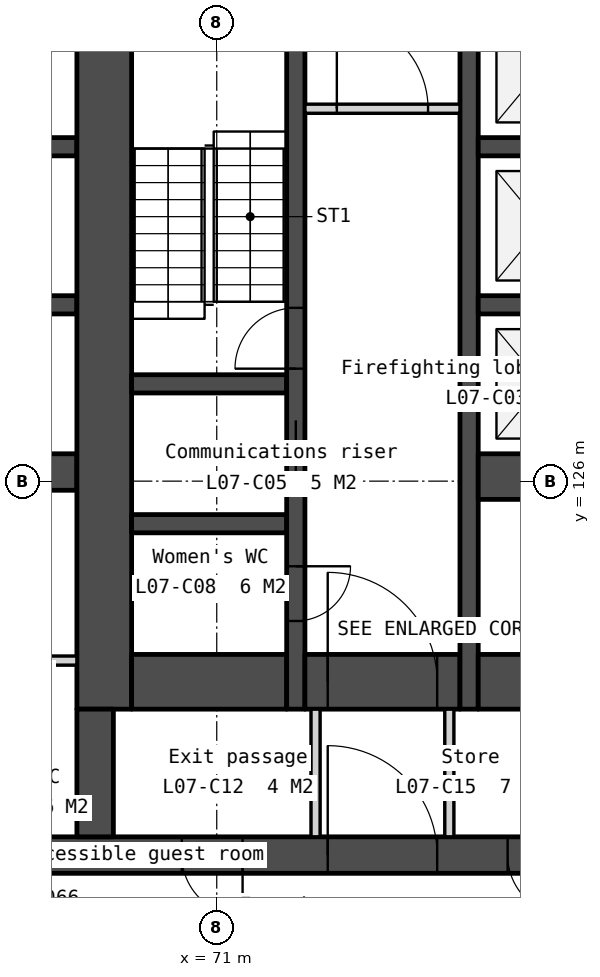
"""IFC4 building model, lengths in metres.
Left out: names, types, materials, properties, quantities, classifications, styles, units other than length and angle.
Written with IfcOpenShell. Run it as: python <this file> out.ifc"""

import sys

from ifc_helpers import new_model, si_unit, direction, frame, frame_2d, origin, place, context, subcontext, project, spatial, polyline, rectangle, outline, extrude, element, fill, save


model = new_model("IFC4")
c1 = context("Model", 3, precision=1e-05, world=origin(), true_north=direction((0.0, 1.0)))
c2 = subcontext(c1, "Body", "Model", "MODEL_VIEW")
j1 = project(units=[si_unit("LENGTHUNIT", "METRE"), si_unit("PLANEANGLEUNIT", "RADIAN")], contexts=[c1])
p1 = place(None, origin())
s1 = spatial("IfcSite", under=j1, at=p1, CompositionType="ELEMENT")
p2 = place(p1, origin())
s2 = spatial("IfcBuilding", under=s1, at=p2, CompositionType="ELEMENT")
p3 = place(p2, frame((0.0, 0.0, 38.5)))
s3 = spatial("IfcBuildingStorey", under=s2, at=p3, CompositionType="ELEMENT", Elevation=38.5)
p4 = place(p3, frame((66.0, 119.85, 0.0), z_axis=(0.0, 0.0, 1.0), x_axis=(1.0, 0.0, 0.0)))
e1 = element("IfcWall", 1, at=p4, inside=s3, PredefinedType="SOLIDWALL", context=c2, shape_type="SweptSolid", body=[
    extrude(rectangle(XDim=28.0, YDim=0.6, at=frame_2d((14.0, 0.0))), origin(), (0.0, 0.0, 1.0), 3.35),
])
p5 = place(p4, frame((6.825, 0.0, 0.0)))
e2 = element("IfcOpeningElement", 2, at=p5, cuts=e1, PredefinedType="OPENING", context=c2, shape_type="SweptSolid", body=[
    extrude(rectangle(XDim=1.8, YDim=2.1, at=frame_2d((0.9, 1.05))), frame((0.0, 0.31, 0.0), z_axis=(0.0, -1.0, 0.0), x_axis=(1.0, 0.0, 0.0)), (0.0, 0.0, 1.0), 0.62),
])
p6 = place(p4, frame((15.85, 0.0, 0.0)))
e3 = element("IfcOpeningElement", 3, at=p6, cuts=e1, PredefinedType="OPENING", context=c2, shape_type="SweptSolid", body=[
    extrude(rectangle(XDim=1.5, YDim=2.1, at=frame_2d((0.75, 1.05))), frame((0.0, 0.31, 0.0), z_axis=(0.0, -1.0, 0.0), x_axis=(1.0, 0.0, 0.0)), (0.0, 0.0, 1.0), 0.62),
])
p7 = place(p4, frame((19.375, 0.0, 0.0)))
e4 = element("IfcOpeningElement", 4, at=p7, cuts=e1, PredefinedType="OPENING", context=c2, shape_type="SweptSolid", body=[
    extrude(rectangle(XDim=1.8, YDim=2.1, at=frame_2d((0.9, 1.05))), frame((0.0, 0.31, 0.0), z_axis=(0.0, -1.0, 0.0), x_axis=(1.0, 0.0, 0.0)), (0.0, 0.0, 1.0), 0.62),
])
p8 = place(p4, frame((4.425, 0.0, 0.0)))
e5 = element("IfcOpeningElement", 5, at=p8, cuts=e1, PredefinedType="OPENING", context=c2, shape_type="SweptSolid", body=[
    extrude(rectangle(XDim=1.0, YDim=2.1, at=frame_2d((0.5, 1.05))), frame((0.0, 0.31, 0.0), z_axis=(0.0, -1.0, 0.0), x_axis=(1.0, 0.0, 0.0)), (0.0, 0.0, 1.0), 0.62),
])
p9 = place(p4, frame((9.783, 0.0, 0.0)))
e6 = element("IfcOpeningElement", 6, at=p9, cuts=e1, PredefinedType="OPENING", context=c2, shape_type="SweptSolid", body=[
    extrude(rectangle(XDim=1.0, YDim=2.1, at=frame_2d((0.5, 1.05))), frame((0.0, 0.31, 0.0), z_axis=(0.0, -1.0, 0.0), x_axis=(1.0, 0.0, 0.0)), (0.0, 0.0, 1.0), 0.62),
])
p10 = place(p4, frame((11.525, 0.0, 0.0)))
e7 = element("IfcOpeningElement", 7, at=p10, cuts=e1, PredefinedType="OPENING", context=c2, shape_type="SweptSolid", body=[
    extrude(rectangle(XDim=1.0, YDim=2.1, at=frame_2d((0.5, 1.05))), frame((0.0, 0.31, 0.0), z_axis=(0.0, -1.0, 0.0), x_axis=(1.0, 0.0, 0.0)), (0.0, 0.0, 1.0), 0.62),
])
p11 = place(p4, frame((13.658, 0.0, 0.0)))
e8 = element("IfcOpeningElement", 8, at=p11, cuts=e1, PredefinedType="OPENING", context=c2, shape_type="SweptSolid", body=[
    extrude(rectangle(XDim=1.0, YDim=2.1, at=frame_2d((0.5, 1.05))), frame((0.0, 0.31, 0.0), z_axis=(0.0, -1.0, 0.0), x_axis=(1.0, 0.0, 0.0)), (0.0, 0.0, 1.0), 0.62),
])
p12 = place(p4, frame((22.575, 0.0, 0.0)))
e9 = element("IfcOpeningElement", 9, at=p12, cuts=e1, PredefinedType="OPENING", context=c2, shape_type="SweptSolid", body=[
    extrude(rectangle(XDim=1.0, YDim=2.1, at=frame_2d((0.5, 1.05))), frame((0.0, 0.31, 0.0), z_axis=(0.0, -1.0, 0.0), x_axis=(1.0, 0.0, 0.0)), (0.0, 0.0, 1.0), 0.62),
])
for number, where, z_axis, x_axis in (
    (10, (66.6, 131.5, 0.0), (0.0, 0.0, 1.0), (1.0, 0.0, 0.0)),
    (11, (66.6, 128.9, 0.0), (0.0, 0.0, 1.0), (1.0, 0.0, 0.0)),
):
    element("IfcWall", number, at=place(p3, frame(where, z_axis=z_axis, x_axis=x_axis)), inside=s3, PredefinedType="SOLIDWALL", context=c2, shape_type="SweptSolid", body=[
        extrude(rectangle(XDim=2.1, YDim=0.3, at=frame_2d((1.05, 0.0))), origin(), (0.0, 0.0, 1.0), 3.35),
    ])
p13 = place(p3, frame((66.6, 126.15, 0.0), z_axis=(0.0, 0.0, 1.0), x_axis=(1.0, 0.0, 0.0)))
e12 = element("IfcWall", 12, at=p13, inside=s3, PredefinedType="SOLIDWALL", context=c2, shape_type="SweptSolid", body=[
    extrude(rectangle(XDim=2.1, YDim=0.6, at=frame_2d((1.05, 0.0))), origin(), (0.0, 0.0, 1.0), 3.35),
])
p14 = place(p3, frame((66.6, 123.049, 0.0), z_axis=(0.0, 0.0, 1.0), x_axis=(1.0, 0.0, 0.0)))
e13 = element("IfcWall", 13, at=p14, inside=s3, PredefinedType="PARTITIONING", context=c2, shape_type="SweptSolid", body=[
    extrude(rectangle(XDim=2.1, YDim=0.15, at=frame_2d((1.05, 0.0))), origin(), (0.0, 0.0, 1.0), 3.35),
])
p15 = place(p3, frame((69.15, 133.95, 0.0), z_axis=(0.0, 0.0, 1.0), x_axis=(0.0, -1.0, 0.0)))
e14 = element("IfcWall", 14, at=p15, inside=s3, PredefinedType="SOLIDWALL", context=c2, shape_type="SweptSolid", body=[
    extrude(rectangle(XDim=11.7, YDim=0.9, at=frame_2d((5.85, 0.0))), origin(), (0.0, 0.0, 1.0), 3.35),
])
p16 = place(p3, frame((69.0, 122.25, 0.0), z_axis=(0.0, 0.0, 1.0), x_axis=(0.0, -1.0, 0.0)))
e15 = element("IfcWall", 15, at=p16, inside=s3, PredefinedType="SOLIDWALL", context=c2, shape_type="SweptSolid", body=[
    extrude(rectangle(XDim=2.1, YDim=0.6, at=frame_2d((1.05, 0.0))), origin(), (0.0, 0.0, 1.0), 3.35),
])
for number, where, z_axis, x_axis in (
    (16, (69.6, 127.6, 0.0), (0.0, 0.0, 1.0), (1.0, 0.0, 0.0)),
    (17, (69.6, 125.3, 0.0), (0.0, 0.0, 1.0), (1.0, 0.0, 0.0)),
):
    element("IfcWall", number, at=place(p3, frame(where, z_axis=z_axis, x_axis=x_axis)), inside=s3, PredefinedType="SOLIDWALL", context=c2, shape_type="SweptSolid", body=[
        extrude(rectangle(XDim=2.55, YDim=0.3, at=frame_2d((1.275, 0.0))), origin(), (0.0, 0.0, 1.0), 3.35),
    ])
p17 = place(p3, frame((69.6, 122.7, 0.0), z_axis=(0.0, 0.0, 1.0), x_axis=(1.0, 0.0, 0.0)))
e18 = element("IfcWall", 18, at=p17, inside=s3, PredefinedType="SOLIDWALL", context=c2, shape_type="SweptSolid", body=[
    extrude(rectangle(XDim=2.55, YDim=0.9, at=frame_2d((1.275, 0.0))), origin(), (0.0, 0.0, 1.0), 3.35),
])
p18 = place(p3, frame((72.3, 133.95, 0.0), z_axis=(0.0, 0.0, 1.0), x_axis=(0.0, -1.0, 0.0)))
e19 = element("IfcWall", 19, at=p18, inside=s3, PredefinedType="SOLIDWALL", context=c2, shape_type="SweptSolid", body=[
    extrude(rectangle(XDim=11.7, YDim=0.3, at=frame_2d((5.85, 0.0))), origin(), (0.0, 0.0, 1.0), 3.35),
])
p19 = place(p18, frame((6.95, 0.0, 0.0)))
e20 = element("IfcOpeningElement", 20, at=p19, cuts=e19, PredefinedType="OPENING", context=c2, shape_type="SweptSolid", body=[
    extrude(rectangle(XDim=1.1, YDim=2.1, at=frame_2d((0.55, 1.05))), frame((0.0, 0.16, 0.0), z_axis=(0.0, -1.0, 0.0), x_axis=(1.0, 0.0, 0.0)), (0.0, 0.0, 1.0), 0.32),
])
p20 = place(p18, frame((9.35, 0.0, 0.0)))
e21 = element("IfcOpeningElement", 21, at=p20, cuts=e19, PredefinedType="OPENING", context=c2, shape_type="SweptSolid", body=[
    extrude(rectangle(XDim=0.9, YDim=2.1, at=frame_2d((0.45, 1.05))), frame((0.0, 0.16, 0.0), z_axis=(0.0, -1.0, 0.0), x_axis=(1.0, 0.0, 0.0)), (0.0, 0.0, 1.0), 0.32),
])
p21 = place(p18, frame((5.1, 0.0, 0.0)))
e22 = element("IfcOpeningElement", 22, at=p21, cuts=e19, PredefinedType="OPENING", context=c2, shape_type="SweptSolid", body=[
    extrude(rectangle(XDim=1.0, YDim=2.1, at=frame_2d((0.5, 1.05))), frame((0.0, 0.16, 0.0), z_axis=(0.0, -1.0, 0.0), x_axis=(1.0, 0.0, 0.0)), (0.0, 0.0, 1.0), 0.32),
])
p22 = place(p3, frame((72.45, 132.125, 0.0), z_axis=(0.0, 0.0, 1.0), x_axis=(1.0, 0.0, 0.0)))
e23 = element("IfcWall", 23, at=p22, inside=s3, PredefinedType="PARTITIONING", context=c2, shape_type="SweptSolid", body=[
    extrude(rectangle(XDim=2.55, YDim=0.15, at=frame_2d((1.275, 0.0))), origin(), (0.0, 0.0, 1.0), 3.35),
])
p23 = place(p22, frame((0.525, 0.0, 0.0)))
e24 = element("IfcOpeningElement", 24, at=p23, cuts=e23, PredefinedType="OPENING", context=c2, shape_type="SweptSolid", body=[
    extrude(rectangle(XDim=1.5, YDim=2.1, at=frame_2d((0.75, 1.05))), frame((0.0, 0.085, 0.0), z_axis=(0.0, -1.0, 0.0), x_axis=(1.0, 0.0, 0.0)), (0.0, 0.0, 1.0), 0.17),
])
p24 = place(p3, frame((72.45, 122.7, 0.0), z_axis=(0.0, 0.0, 1.0), x_axis=(1.0, 0.0, 0.0)))
e25 = element("IfcWall", 25, at=p24, inside=s3, PredefinedType="SOLIDWALL", context=c2, shape_type="SweptSolid", body=[
    extrude(rectangle(XDim=2.55, YDim=0.9, at=frame_2d((1.275, 0.0))), origin(), (0.0, 0.0, 1.0), 3.35),
])
p25 = place(p24, frame((0.375, 0.0, 0.0)))
e26 = element("IfcOpeningElement", 26, at=p25, cuts=e25, PredefinedType="OPENING", context=c2, shape_type="SweptSolid", body=[
    extrude(rectangle(XDim=1.8, YDim=2.1, at=frame_2d((0.9, 1.05))), frame((0.0, 0.46, 0.0), z_axis=(0.0, -1.0, 0.0), x_axis=(1.0, 0.0, 0.0)), (0.0, 0.0, 1.0), 0.92),
])
for number, where, z_axis, x_axis in (
    (27, (72.625, 122.25, 0.0), (0.0, 0.0, 1.0), (0.0, -1.0, 0.0)),
    (28, (74.825, 122.25, 0.0), (0.0, 0.0, 1.0), (0.0, -1.0, 0.0)),
):
    element("IfcWall", number, at=place(p3, frame(where, z_axis=z_axis, x_axis=x_axis)), inside=s3, PredefinedType="PARTITIONING", context=c2, shape_type="SweptSolid", body=[
        extrude(rectangle(XDim=2.1, YDim=0.15, at=frame_2d((1.05, 0.0))), origin(), (0.0, 0.0, 1.0), 3.35),
    ])
p26 = place(p3, frame((75.15, 133.95, 0.0), z_axis=(0.0, 0.0, 1.0), x_axis=(0.0, -1.0, 0.0)))
e29 = element("IfcWall", 29, at=p26, inside=s3, PredefinedType="SOLIDWALL", context=c2, shape_type="SweptSolid", body=[
    extrude(rectangle(XDim=11.7, YDim=0.3, at=frame_2d((5.85, 0.0))), origin(), (0.0, 0.0, 1.0), 3.35),
])
for number, where, z_axis, x_axis in (
    (30, (75.3, 131.5, 0.0), (0.0, 0.0, 1.0), (1.0, 0.0, 0.0)),
    (31, (75.3, 128.9, 0.0), (0.0, 0.0, 1.0), (1.0, 0.0, 0.0)),
):
    element("IfcWall", number, at=place(p3, frame(where, z_axis=z_axis, x_axis=x_axis)), inside=s3, PredefinedType="SOLIDWALL", context=c2, shape_type="SweptSolid", body=[
        extrude(rectangle(XDim=2.1, YDim=0.3, at=frame_2d((1.05, 0.0))), origin(), (0.0, 0.0, 1.0), 3.35),
    ])
p27 = place(p3, frame((75.3, 126.075, 0.0), z_axis=(0.0, 0.0, 1.0), x_axis=(1.0, 0.0, 0.0)))
e32 = element("IfcWall", 32, at=p27, inside=s3, PredefinedType="SOLIDWALL", context=c2, shape_type="SweptSolid", body=[
    extrude(rectangle(XDim=2.1, YDim=0.75, at=frame_2d((1.05, 0.0))), origin(), (0.0, 0.0, 1.0), 3.35),
])
p28 = place(p3, frame((75.3, 122.7, 0.0), z_axis=(0.0, 0.0, 1.0), x_axis=(1.0, 0.0, 0.0)))
e33 = element("IfcWall", 33, at=p28, inside=s3, PredefinedType="SOLIDWALL", context=c2, shape_type="SweptSolid", body=[
    extrude(rectangle(XDim=6.2, YDim=0.9, at=frame_2d((3.1, 0.0))), origin(), (0.0, 0.0, 1.0), 3.35),
])
p29 = place(p3, frame((54.495, 129.397, -0.15), z_axis=(0.0, 0.0, 1.0), x_axis=(0.499999201451, -0.866025864826, 0.0)))
e34 = element("IfcWall", 34, at=p29, inside=s3, PredefinedType="SOLIDWALL", context=c2, shape_type="SweptSolid", body=[
    extrude(outline(polyline([(44.8, 0.0), (44.8, 3.5), (0.0, 3.5), (0.0, 0.0), (44.8, 0.0)])), frame((0.0, 0.225, 0.0), z_axis=(0.0, -1.0, 0.0), x_axis=(1.0, 0.0, 0.0)), (0.0, 0.0, 1.0), 0.45),
])
p30 = place(p29, frame((0.722, 0.0, 1.05)))
e35 = element("IfcOpeningElement", 35, at=p30, cuts=e34, PredefinedType="OPENING", context=c2, shape_type="SweptSolid", body=[
    extrude(rectangle(XDim=1.2, YDim=1.5, at=frame_2d((0.6, 0.75))), frame((0.0, 0.235, 0.0), z_axis=(0.0, -1.0, 0.0), x_axis=(1.0, 0.0, 0.0)), (0.0, 0.0, 1.0), 0.47),
])
p31 = place(p29, frame((7.51, 0.0, 1.05)))
e36 = element("IfcOpeningElement", 36, at=p31, cuts=e34, PredefinedType="OPENING", context=c2, shape_type="SweptSolid", body=[
    extrude(rectangle(XDim=1.2, YDim=1.5, at=frame_2d((0.6, 0.75))), frame((0.0, 0.235, 0.0), z_axis=(0.0, -1.0, 0.0), x_axis=(1.0, 0.0, 0.0)), (0.0, 0.0, 1.0), 0.47),
])
p32 = place(p29, frame((9.21, 0.0, 1.05)))
e37 = element("IfcOpeningElement", 37, at=p32, cuts=e34, PredefinedType="OPENING", context=c2, shape_type="SweptSolid", body=[
    extrude(rectangle(XDim=1.2, YDim=1.5, at=frame_2d((0.6, 0.75))), frame((0.0, 0.235, 0.0), z_axis=(0.0, -1.0, 0.0), x_axis=(1.0, 0.0, 0.0)), (0.0, 0.0, 1.0), 0.47),
])
p33 = place(p29, frame((16.47, 0.0, 1.05)))
e38 = element("IfcOpeningElement", 38, at=p33, cuts=e34, PredefinedType="OPENING", context=c2, shape_type="SweptSolid", body=[
    extrude(rectangle(XDim=1.2, YDim=1.5, at=frame_2d((0.6, 0.75))), frame((0.0, 0.235, 0.0), z_axis=(0.0, -1.0, 0.0), x_axis=(1.0, 0.0, 0.0)), (0.0, 0.0, 1.0), 0.47),
])
p34 = place(p29, frame((18.17, 0.0, 1.05)))
e39 = element("IfcOpeningElement", 39, at=p34, cuts=e34, PredefinedType="OPENING", context=c2, shape_type="SweptSolid", body=[
    extrude(rectangle(XDim=1.2, YDim=1.5, at=frame_2d((0.6, 0.75))), frame((0.0, 0.235, 0.0), z_axis=(0.0, -1.0, 0.0), x_axis=(1.0, 0.0, 0.0)), (0.0, 0.0, 1.0), 0.47),
])
p35 = place(p29, frame((25.43, 0.0, 1.05)))
e40 = element("IfcOpeningElement", 40, at=p35, cuts=e34, PredefinedType="OPENING", context=c2, shape_type="SweptSolid", body=[
    extrude(rectangle(XDim=1.2, YDim=1.5, at=frame_2d((0.6, 0.75))), frame((0.0, 0.235, 0.0), z_axis=(0.0, -1.0, 0.0), x_axis=(1.0, 0.0, 0.0)), (0.0, 0.0, 1.0), 0.47),
])
p36 = place(p29, frame((27.13, 0.0, 1.05)))
e41 = element("IfcOpeningElement", 41, at=p36, cuts=e34, PredefinedType="OPENING", context=c2, shape_type="SweptSolid", body=[
    extrude(rectangle(XDim=1.2, YDim=1.5, at=frame_2d((0.6, 0.75))), frame((0.0, 0.235, 0.0), z_axis=(0.0, -1.0, 0.0), x_axis=(1.0, 0.0, 0.0)), (0.0, 0.0, 1.0), 0.47),
])
p37 = place(p29, frame((34.39, 0.0, 1.05)))
e42 = element("IfcOpeningElement", 42, at=p37, cuts=e34, PredefinedType="OPENING", context=c2, shape_type="SweptSolid", body=[
    extrude(rectangle(XDim=1.2, YDim=1.5, at=frame_2d((0.6, 0.75))), frame((0.0, 0.235, 0.0), z_axis=(0.0, -1.0, 0.0), x_axis=(1.0, 0.0, 0.0)), (0.0, 0.0, 1.0), 0.47),
])
p38 = place(p29, frame((36.09, 0.0, 1.05)))
e43 = element("IfcOpeningElement", 43, at=p38, cuts=e34, PredefinedType="OPENING", context=c2, shape_type="SweptSolid", body=[
    extrude(rectangle(XDim=1.2, YDim=1.5, at=frame_2d((0.6, 0.75))), frame((0.0, 0.235, 0.0), z_axis=(0.0, -1.0, 0.0), x_axis=(1.0, 0.0, 0.0)), (0.0, 0.0, 1.0), 0.47),
])
p39 = place(p29, frame((42.878, 0.0, 1.05)))
e44 = element("IfcOpeningElement", 44, at=p39, cuts=e34, PredefinedType="OPENING", context=c2, shape_type="SweptSolid", body=[
    extrude(rectangle(XDim=1.2, YDim=1.5, at=frame_2d((0.6, 0.75))), frame((0.0, 0.235, 0.0), z_axis=(0.0, -1.0, 0.0), x_axis=(1.0, 0.0, 0.0)), (0.0, 0.0, 1.0), 0.47),
])
p40 = place(p19, origin())
e45 = element("IfcDoor", 45, at=p40, inside=s3, OperationType="SLIDING_TO_LEFT", PredefinedType="DOOR", context=c2, shape_type="SweptSolid", body=[
    extrude(rectangle(XDim=1.1, YDim=2.1, at=frame_2d((0.55, 1.05))), frame((0.0, 0.025, 0.0), z_axis=(0.0, -1.0, 0.0), x_axis=(1.0, 0.0, 0.0)), (0.0, 0.0, 1.0), 0.05),
])
fill(e20, e45)
p41 = place(p25, origin())
e46 = element("IfcDoor", 46, at=p41, inside=s3, OperationType="DOUBLE_DOOR_DOUBLE_SWING", PredefinedType="DOOR", context=c2, shape_type="SweptSolid", body=[
    extrude(rectangle(XDim=1.8, YDim=2.1, at=frame_2d((0.9, 1.05))), frame((0.0, 0.025, 0.0), z_axis=(0.0, -1.0, 0.0), x_axis=(1.0, 0.0, 0.0)), (0.0, 0.0, 1.0), 0.05),
])
fill(e26, e46)
p42 = place(p5, origin())
e47 = element("IfcDoor", 47, at=p42, inside=s3, OperationType="DOUBLE_DOOR_DOUBLE_SWING", PredefinedType="DOOR", context=c2, shape_type="SweptSolid", body=[
    extrude(rectangle(XDim=1.8, YDim=2.1, at=frame_2d((0.9, 1.05))), frame((0.0, 0.025, 0.0), z_axis=(0.0, -1.0, 0.0), x_axis=(1.0, 0.0, 0.0)), (0.0, 0.0, 1.0), 0.05),
])
fill(e2, e47)
p43 = place(p23, origin())
e48 = element("IfcDoor", 48, at=p43, inside=s3, OperationType="DOUBLE_DOOR_DOUBLE_SWING", PredefinedType="DOOR", context=c2, shape_type="SweptSolid", body=[
    extrude(rectangle(XDim=1.5, YDim=2.1, at=frame_2d((0.75, 1.05))), frame((0.0, 0.025, 0.0), z_axis=(0.0, -1.0, 0.0), x_axis=(1.0, 0.0, 0.0)), (0.0, 0.0, 1.0), 0.05),
])
fill(e24, e48)
p44 = place(p20, origin())
e49 = element("IfcDoor", 49, at=p44, inside=s3, OperationType="SINGLE_SWING_LEFT", PredefinedType="DOOR", context=c2, shape_type="SweptSolid", body=[
    extrude(rectangle(XDim=0.9, YDim=2.1, at=frame_2d((0.45, 1.05))), frame((0.0, 0.025, 0.0), z_axis=(0.0, -1.0, 0.0), x_axis=(1.0, 0.0, 0.0)), (0.0, 0.0, 1.0), 0.05),
])
fill(e21, e49)
p45 = place(p8, origin())
e50 = element("IfcDoor", 50, at=p45, inside=s3, OperationType="SINGLE_SWING_RIGHT", PredefinedType="DOOR", context=c2, shape_type="SweptSolid", body=[
    extrude(rectangle(XDim=1.0, YDim=2.1, at=frame_2d((0.5, 1.05))), frame((0.0, 0.025, 0.0), z_axis=(0.0, -1.0, 0.0), x_axis=(1.0, 0.0, 0.0)), (0.0, 0.0, 1.0), 0.05),
])
fill(e5, e50)
p46 = place(p9, origin())
e51 = element("IfcDoor", 51, at=p46, inside=s3, OperationType="SINGLE_SWING_RIGHT", PredefinedType="DOOR", context=c2, shape_type="SweptSolid", body=[
    extrude(rectangle(XDim=1.0, YDim=2.1, at=frame_2d((0.5, 1.05))), frame((0.0, 0.025, 0.0), z_axis=(0.0, -1.0, 0.0), x_axis=(1.0, 0.0, 0.0)), (0.0, 0.0, 1.0), 0.05),
])
fill(e6, e51)
p47 = place(p21, origin())
e52 = element("IfcDoor", 52, at=p47, inside=s3, OperationType="SINGLE_SWING_RIGHT", PredefinedType="DOOR", context=c2, shape_type="SweptSolid", body=[
    extrude(rectangle(XDim=1.0, YDim=2.1, at=frame_2d((0.5, 1.05))), frame((0.0, 0.025, 0.0), z_axis=(0.0, -1.0, 0.0), x_axis=(1.0, 0.0, 0.0)), (0.0, 0.0, 1.0), 0.05),
])
fill(e22, e52)
save(model, sys.argv[1])
